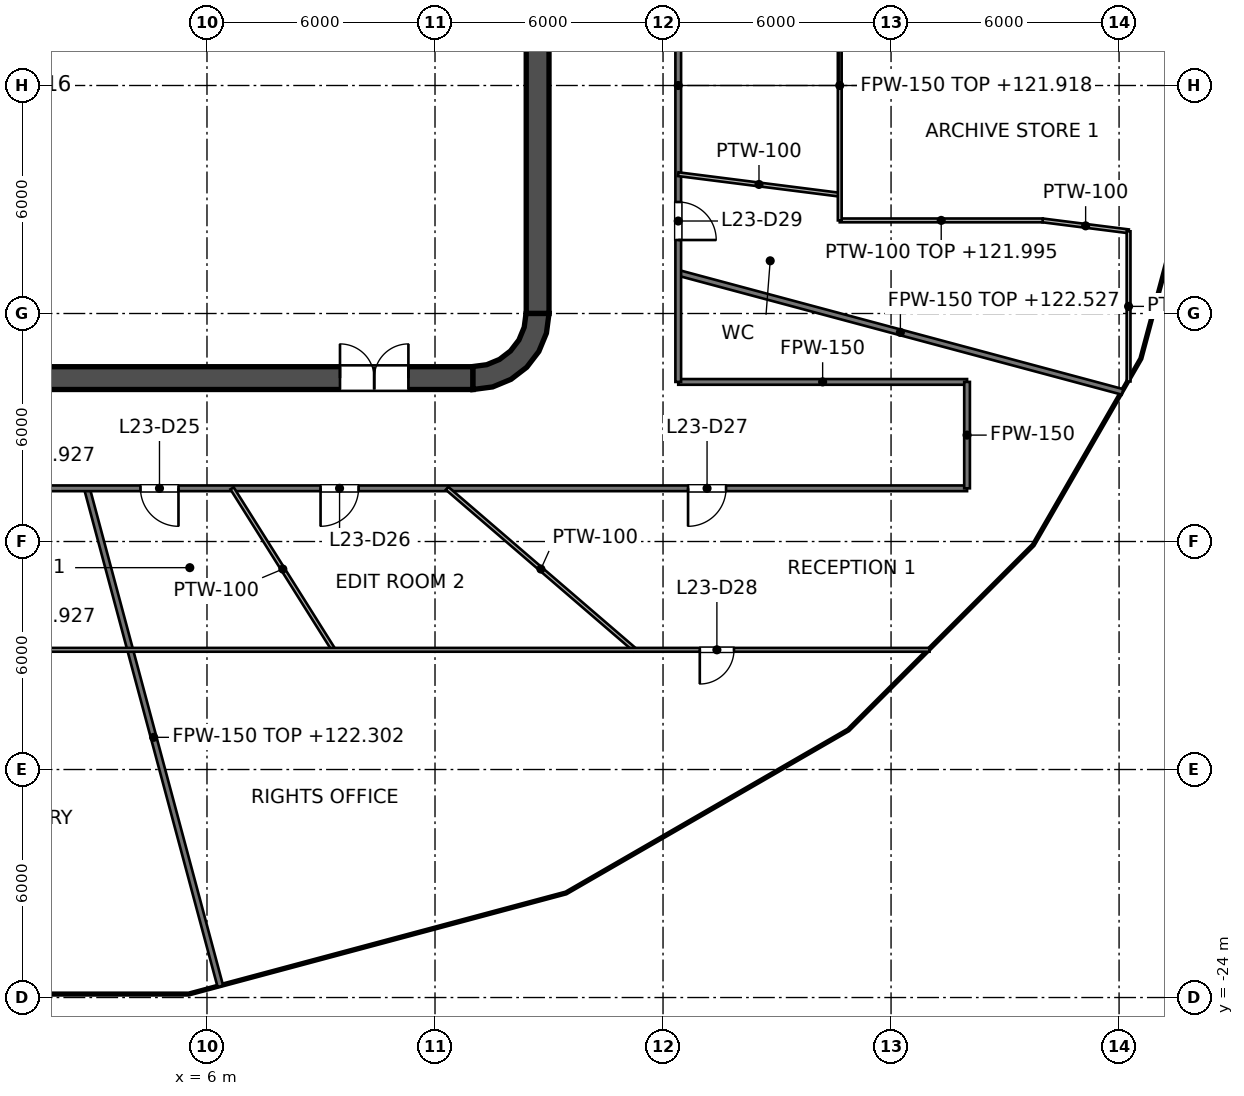
"""IFC4 building model, lengths in metres.
Left out: names, types, materials, properties, quantities, classifications, styles, units other than length and angle.
Written with IfcOpenShell. Run it as: python <this file> out.ifc"""

import sys

from ifc_helpers import new_model, si_unit, direction, frame, frame_2d, origin, place, context, subcontext, project, spatial, polyline, rectangle, outline, extrude, element, fill, save


model = new_model("IFC4")
c1 = context("Model", 3, precision=1e-05, world=origin(), true_north=direction((0.0, 1.0)))
c2 = subcontext(c1, "Body", "Model", "MODEL_VIEW")
j1 = project(units=[si_unit("LENGTHUNIT", "METRE"), si_unit("PLANEANGLEUNIT", "RADIAN")], contexts=[c1])
p1 = place(None, origin())
s1 = spatial("IfcSite", under=j1, at=p1, CompositionType="ELEMENT")
p2 = place(p1, origin())
s2 = spatial("IfcBuilding", under=s1, at=p2, CompositionType="ELEMENT")
p3 = place(p2, frame((0.0, 0.0, 118.8)))
s3 = spatial("IfcBuildingStorey", under=s2, at=p3, CompositionType="ELEMENT", Elevation=118.8)
p4 = place(p3, frame((-13.0, -7.7, 0.0), z_axis=(0.0, 0.0, 1.0), x_axis=(1.0, 0.0, 0.0)))
e1 = element("IfcWall", 1, at=p4, inside=s3, PredefinedType="SHEAR", context=c2, shape_type="SweptSolid", body=[
    extrude(rectangle(XDim=26.0, YDim=0.6, at=frame_2d((13.0, 0.0))), origin(), (0.0, 0.0, 1.0), 4.2),
])
p5 = place(p4, frame((1.7, 0.0, 0.0)))
e2 = element("IfcOpeningElement", 2, at=p5, cuts=e1, PredefinedType="OPENING", context=c2, shape_type="SweptSolid", body=[
    extrude(rectangle(XDim=1.8, YDim=2.1, at=frame_2d((0.9, 1.05))), frame((0.0, 0.3, 0.0), z_axis=(0.0, -1.0, 0.0), x_axis=(1.0, 0.0, 0.0)), (0.0, 0.0, 1.0), 0.6),
])
p6 = place(p4, frame((22.5, 0.0, 0.0)))
e3 = element("IfcOpeningElement", 3, at=p6, cuts=e1, PredefinedType="OPENING", context=c2, shape_type="SweptSolid", body=[
    extrude(rectangle(XDim=1.8, YDim=2.1, at=frame_2d((0.9, 1.05))), frame((0.0, 0.3, 0.0), z_axis=(0.0, -1.0, 0.0), x_axis=(1.0, 0.0, 0.0)), (0.0, 0.0, 1.0), 0.6),
])
p7 = place(p3, frame((14.7, -6.0, 0.0), z_axis=(0.0, 0.0, 1.0), x_axis=(0.0, 1.0, 0.0)))
e4 = element("IfcWall", 4, at=p7, inside=s3, PredefinedType="SHEAR", context=c2, shape_type="SweptSolid", body=[
    extrude(rectangle(XDim=12.0, YDim=0.6, at=frame_2d((6.0, 0.0))), origin(), (0.0, 0.0, 1.0), 4.2),
])
p8 = place(p3, origin())
e5 = element("IfcWall", 5, at=p8, inside=s3, PredefinedType="SHEAR", context=c2, shape_type="SweptSolid", body=[
    extrude(outline(polyline([(15.0, -6.0), (14.395, -6.0), (14.347, -6.361), (14.208, -6.698), (13.986, -6.986), (13.698, -7.208), (13.361, -7.347), (13.0, -7.395), (13.0, -8.0), (13.518, -7.932), (14.0, -7.732), (14.414, -7.414), (14.732, -7.0), (14.932, -6.518), (15.0, -6.0)])), origin(), (0.0, 0.0, 1.0), 4.2),
])
p9 = place(p3, frame((9.0, -6.6, 0.0), z_axis=(0.0, 0.0, 1.0), x_axis=(0.0, 1.0, 0.0)))
e6 = element("IfcWall", 6, at=p9, inside=s3, PredefinedType="SOLIDWALL", context=c2, shape_type="SweptSolid", body=[
    extrude(rectangle(XDim=2.5, YDim=0.25, at=frame_2d((1.25, 0.0))), origin(), (0.0, 0.0, 1.0), 4.05),
])
p10 = place(p9, frame((0.65, 0.0, 0.0)))
e7 = element("IfcOpeningElement", 7, at=p10, cuts=e6, PredefinedType="OPENING", context=c2, shape_type="SweptSolid", body=[
    extrude(rectangle(XDim=1.2, YDim=2.1, at=frame_2d((0.6, 1.05))), frame((0.0, 0.125, 0.0), z_axis=(0.0, -1.0, 0.0), x_axis=(1.0, 0.0, 0.0)), (0.0, 0.0, 1.0), 0.25),
])
p11 = place(p3, frame((3.15, -6.6, 0.0), z_axis=(0.0, 0.0, 1.0), x_axis=(0.0, 1.0, 0.0)))
e8 = element("IfcWall", 8, at=p11, inside=s3, PredefinedType="SOLIDWALL", context=c2, shape_type="SweptSolid", body=[
    extrude(rectangle(XDim=2.5, YDim=0.25, at=frame_2d((1.25, 0.0))), origin(), (0.0, 0.0, 1.0), 4.05),
])
p12 = place(p3, frame((-9.125, -7.0, 0.0), z_axis=(0.0, 0.0, 1.0), x_axis=(1.0, 0.0, 0.0)))
e9 = element("IfcWall", 9, at=p12, inside=s3, PredefinedType="SOLIDWALL", context=c2, shape_type="SweptSolid", body=[
    extrude(rectangle(XDim=18.25, YDim=0.8, at=frame_2d((9.125, 0.0))), origin(), (0.0, 0.0, 1.0), 4.05),
])
p13 = place(p3, frame((-9.125, -1.525, 0.0), z_axis=(0.0, 0.0, 1.0), x_axis=(1.0, 0.0, 0.0)))
e10 = element("IfcWall", 10, at=p13, inside=s3, PredefinedType="SOLIDWALL", context=c2, shape_type="SweptSolid", body=[
    extrude(rectangle(XDim=18.25, YDim=0.25, at=frame_2d((9.125, 0.0))), origin(), (0.0, 0.0, 1.0), 4.05),
])
p14 = place(p13, frame((7.15, 0.0, 0.0)))
e11 = element("IfcOpeningElement", 11, at=p14, cuts=e10, PredefinedType="OPENING", context=c2, shape_type="SweptSolid", body=[
    extrude(rectangle(XDim=1.2, YDim=2.1, at=frame_2d((0.6, 1.05))), frame((0.0, 0.125, 0.0), z_axis=(0.0, -1.0, 0.0), x_axis=(1.0, 0.0, 0.0)), (0.0, 0.0, 1.0), 0.25),
])
p15 = place(p13, frame((10.2, 0.0, 0.0)))
e12 = element("IfcOpeningElement", 12, at=p15, cuts=e10, PredefinedType="OPENING", context=c2, shape_type="SweptSolid", body=[
    extrude(rectangle(XDim=1.2, YDim=2.1, at=frame_2d((0.6, 1.05))), frame((0.0, 0.125, 0.0), z_axis=(0.0, -1.0, 0.0), x_axis=(1.0, 0.0, 0.0)), (0.0, 0.0, 1.0), 0.25),
])
p16 = place(p13, frame((16.075, 0.0, 0.0)))
e13 = element("IfcOpeningElement", 13, at=p16, cuts=e10, PredefinedType="OPENING", context=c2, shape_type="SweptSolid", body=[
    extrude(rectangle(XDim=1.0, YDim=2.1, at=frame_2d((0.5, 1.05))), frame((0.0, 0.125, 0.0), z_axis=(0.0, -1.0, 0.0), x_axis=(1.0, 0.0, 0.0)), (0.0, 0.0, 1.0), 0.25),
])
p17 = place(p3, frame((-9.125, -3.975, 0.0), z_axis=(0.0, 0.0, 1.0), x_axis=(1.0, 0.0, 0.0)))
e14 = element("IfcWall", 14, at=p17, inside=s3, PredefinedType="SOLIDWALL", context=c2, shape_type="SweptSolid", body=[
    extrude(rectangle(XDim=12.4, YDim=0.25, at=frame_2d((6.2, 0.0))), origin(), (0.0, 0.0, 1.0), 4.05),
])
p18 = place(p17, frame((1.05, 0.0, 0.0)))
e15 = element("IfcOpeningElement", 15, at=p18, cuts=e14, PredefinedType="OPENING", context=c2, shape_type="SweptSolid", body=[
    extrude(rectangle(XDim=1.2, YDim=2.1, at=frame_2d((0.6, 1.05))), frame((0.0, 0.125, 0.0), z_axis=(0.0, -1.0, 0.0), x_axis=(1.0, 0.0, 0.0)), (0.0, 0.0, 1.0), 0.25),
])
p19 = place(p17, frame((4.1, 0.0, 0.0)))
e16 = element("IfcOpeningElement", 16, at=p19, cuts=e14, PredefinedType="OPENING", context=c2, shape_type="SweptSolid", body=[
    extrude(rectangle(XDim=1.2, YDim=2.1, at=frame_2d((0.6, 1.05))), frame((0.0, 0.125, 0.0), z_axis=(0.0, -1.0, 0.0), x_axis=(1.0, 0.0, 0.0)), (0.0, 0.0, 1.0), 0.25),
])
p20 = place(p3, frame((3.275, -3.975, 0.0), z_axis=(0.0, 0.0, 1.0), x_axis=(1.0, 0.0, 0.0)))
e17 = element("IfcWall", 17, at=p20, inside=s3, PredefinedType="SOLIDWALL", context=c2, shape_type="SweptSolid", body=[
    extrude(rectangle(XDim=5.85, YDim=0.25, at=frame_2d((2.925, 0.0))), origin(), (0.0, 0.0, 1.0), 4.05),
])
for number, where, z_axis, x_axis in (
    (18, (3.2, -3.85, 0.0), (0.0, 0.0, 1.0), (0.0, 1.0, 0.0)),
    (19, (5.9, -3.85, 0.0), (0.0, 0.0, 1.0), (0.0, 1.0, 0.0)),
    (20, (9.0, -3.85, 0.0), (0.0, 0.0, 1.0), (0.0, 1.0, 0.0)),
):
    element("IfcWall", number, at=place(p3, frame(where, z_axis=z_axis, x_axis=x_axis)), inside=s3, PredefinedType="SOLIDWALL", context=c2, shape_type="SweptSolid", body=[
        extrude(rectangle(XDim=2.2, YDim=0.25, at=frame_2d((1.1, 0.0))), origin(), (0.0, 0.0, 1.0), 4.05),
    ])
p21 = place(p3, frame((11.8, -7.4, 0.0), z_axis=(0.0, 0.0, 1.0), x_axis=(0.0, 1.0, 0.0)))
e21 = element("IfcWall", 21, at=p21, inside=s3, PredefinedType="SOLIDWALL", context=c2, shape_type="SweptSolid", body=[
    extrude(rectangle(XDim=14.8, YDim=0.4, at=frame_2d((7.4, 0.0))), origin(), (0.0, 0.0, 1.0), 4.05),
])
p22 = place(p21, frame((11.2, 0.0, 0.0)))
e22 = element("IfcOpeningElement", 22, at=p22, cuts=e21, PredefinedType="OPENING", context=c2, shape_type="SweptSolid", body=[
    extrude(rectangle(XDim=1.1, YDim=2.1, at=frame_2d((0.55, 1.05))), frame((0.0, 0.2, 0.0), z_axis=(0.0, -1.0, 0.0), x_axis=(1.0, 0.0, 0.0)), (0.0, 0.0, 1.0), 0.4),
])
p23 = place(p21, frame((8.3, 0.0, 0.0)))
e23 = element("IfcOpeningElement", 23, at=p23, cuts=e21, PredefinedType="OPENING", context=c2, shape_type="SweptSolid", body=[
    extrude(rectangle(XDim=1.1, YDim=2.1, at=frame_2d((0.55, 1.05))), frame((0.0, 0.2, 0.0), z_axis=(0.0, -1.0, 0.0), x_axis=(1.0, 0.0, 0.0)), (0.0, 0.0, 1.0), 0.4),
])
p24 = place(p21, frame((5.4, 0.0, 0.0)))
e24 = element("IfcOpeningElement", 24, at=p24, cuts=e21, PredefinedType="OPENING", context=c2, shape_type="SweptSolid", body=[
    extrude(rectangle(XDim=1.1, YDim=2.1, at=frame_2d((0.55, 1.05))), frame((0.0, 0.2, 0.0), z_axis=(0.0, -1.0, 0.0), x_axis=(1.0, 0.0, 0.0)), (0.0, 0.0, 1.0), 0.4),
])
p25 = place(p21, frame((13.552, 0.0, 0.0)))
e25 = element("IfcOpeningElement", 25, at=p25, cuts=e21, PredefinedType="OPENING", context=c2, shape_type="SweptSolid", body=[
    extrude(rectangle(XDim=0.9, YDim=2.1, at=frame_2d((0.45, 1.05))), frame((0.0, 0.2, 0.0), z_axis=(0.0, -1.0, 0.0), x_axis=(1.0, 0.0, 0.0)), (0.0, 0.0, 1.0), 0.4),
])
p26 = place(p21, frame((0.347, 0.0, 0.0)))
e26 = element("IfcOpeningElement", 26, at=p26, cuts=e21, PredefinedType="OPENING", context=c2, shape_type="SweptSolid", body=[
    extrude(rectangle(XDim=0.9, YDim=2.1, at=frame_2d((0.45, 1.05))), frame((0.0, 0.2, 0.0), z_axis=(0.0, -1.0, 0.0), x_axis=(1.0, 0.0, 0.0)), (0.0, 0.0, 1.0), 0.4),
])
e27 = element("IfcWall", 27, at=p8, inside=s3, PredefinedType="SOLIDWALL", context=c2, shape_type="SweptSolid", body=[
    extrude(outline(polyline([(12.0, -5.675), (12.0, -5.925), (14.15, -5.925), (14.4, -5.925), (14.4, -5.675), (14.4, -3.025), (14.4, -2.775), (14.4, -0.125), (14.4, 0.125), (14.4, 2.775), (14.4, 3.025), (14.4, 5.675), (14.4, 5.925), (14.15, 5.925), (12.0, 5.925), (12.0, 5.675), (14.15, 5.675), (14.15, 3.025), (12.0, 3.025), (12.0, 2.775), (14.15, 2.775), (14.15, 0.125), (12.0, 0.125), (12.0, -0.125), (14.15, -0.125), (14.15, -2.775), (12.0, -2.775), (12.0, -3.025), (14.15, -3.025), (14.15, -5.675), (12.0, -5.675)])), origin(), (0.0, 0.0, 1.0), 4.05),
])
p27 = place(p3, frame((2.84, -10.6, 0.0), z_axis=(0.0, 0.0, 1.0), x_axis=(0.258835018107, -0.965921546194, 0.0)))
e28 = element("IfcWall", 28, at=p27, inside=s3, PredefinedType="PARTITIONING", context=c2, shape_type="SweptSolid", body=[
    extrude(rectangle(XDim=13.568, YDim=0.15, at=frame_2d((6.784, 0.0))), origin(), (0.0, 0.0, 1.0), 3.502),
])
p28 = place(p3, frame((18.4, -4.93, 0.0), z_axis=(0.0, 0.0, 1.0), x_axis=(0.965917167339, -0.258851358583, 0.0)))
e29 = element("IfcWall", 29, at=p28, inside=s3, PredefinedType="PARTITIONING", context=c2, shape_type="SweptSolid", body=[
    extrude(rectangle(XDim=12.104, YDim=0.15, at=frame_2d((6.052, 0.0))), origin(), (0.0, 0.0, 1.0), 3.727),
])
p29 = place(p3, frame((-26.0, -10.6, 0.0), z_axis=(0.0, 0.0, 1.0), x_axis=(1.0, 0.0, 0.0)))
e30 = element("IfcWall", 30, at=p29, inside=s3, PredefinedType="PARTITIONING", context=c2, shape_type="SweptSolid", body=[
    extrude(rectangle(XDim=52.0, YDim=0.15, at=frame_2d((26.0, 0.0))), origin(), (0.0, 0.0, 1.0), 3.127),
])
p30 = place(p29, frame((17.62, 0.0, 0.0)))
e31 = element("IfcOpeningElement", 31, at=p30, cuts=e30, PredefinedType="OPENING", context=c2, shape_type="SweptSolid", body=[
    extrude(rectangle(XDim=1.2, YDim=2.1, at=frame_2d((0.6, 1.05))), frame((0.0, 0.075, 0.0), z_axis=(0.0, -1.0, 0.0), x_axis=(1.0, 0.0, 0.0)), (0.0, 0.0, 1.0), 0.15),
])
p31 = place(p29, frame((30.25, 0.0, 0.0)))
e32 = element("IfcOpeningElement", 32, at=p31, cuts=e30, PredefinedType="OPENING", context=c2, shape_type="SweptSolid", body=[
    extrude(rectangle(XDim=1.0, YDim=2.1, at=frame_2d((0.5, 1.05))), frame((0.0, 0.075, 0.0), z_axis=(0.0, -1.0, 0.0), x_axis=(1.0, 0.0, 0.0)), (0.0, 0.0, 1.0), 0.15),
])
p32 = place(p29, frame((34.989, 0.0, 0.0)))
e33 = element("IfcOpeningElement", 33, at=p32, cuts=e30, PredefinedType="OPENING", context=c2, shape_type="SweptSolid", body=[
    extrude(rectangle(XDim=1.0, YDim=2.1, at=frame_2d((0.5, 1.05))), frame((0.0, 0.075, 0.0), z_axis=(0.0, -1.0, 0.0), x_axis=(1.0, 0.0, 0.0)), (0.0, 0.0, 1.0), 0.15),
])
p33 = place(p29, frame((44.658, 0.0, 0.0)))
e34 = element("IfcOpeningElement", 34, at=p33, cuts=e30, PredefinedType="OPENING", context=c2, shape_type="SweptSolid", body=[
    extrude(rectangle(XDim=1.0, YDim=2.1, at=frame_2d((0.5, 1.05))), frame((0.0, 0.075, 0.0), z_axis=(0.0, -1.0, 0.0), x_axis=(1.0, 0.0, 0.0)), (0.0, 0.0, 1.0), 0.15),
])
p34 = place(p3, frame((18.4, -7.8, 0.0), z_axis=(0.0, 0.0, 1.0), x_axis=(1.0, 0.0, 0.0)))
e35 = element("IfcWall", 35, at=p34, inside=s3, PredefinedType="PARTITIONING", context=c2, shape_type="SweptSolid", body=[
    extrude(rectangle(XDim=7.6, YDim=0.15, at=frame_2d((3.8, 0.0))), origin(), (0.0, 0.0, 1.0), 3.276),
])
p35 = place(p3, frame((26.0, -10.6, 0.0), z_axis=(0.0, 0.0, 1.0), x_axis=(0.0, 1.0, 0.0)))
e36 = element("IfcWall", 36, at=p35, inside=s3, PredefinedType="PARTITIONING", context=c2, shape_type="SweptSolid", body=[
    extrude(rectangle(XDim=2.8, YDim=0.15, at=frame_2d((1.4, 0.0))), origin(), (0.0, 0.0, 1.0), 3.276),
])
p36 = place(p3, frame((18.4, -7.8, 0.0), z_axis=(0.0, 0.0, 1.0), x_axis=(0.0, 1.0, 0.0)))
e37 = element("IfcWall", 37, at=p36, inside=s3, PredefinedType="PARTITIONING", context=c2, shape_type="SweptSolid", body=[
    extrude(rectangle(XDim=15.6, YDim=0.15, at=frame_2d((7.8, 0.0))), origin(), (0.0, 0.0, 1.0), 3.118),
])
p37 = place(p36, frame((3.734, 0.0, 0.0)))
e38 = element("IfcOpeningElement", 38, at=p37, cuts=e37, PredefinedType="OPENING", context=c2, shape_type="SweptSolid", body=[
    extrude(rectangle(XDim=1.0, YDim=2.1, at=frame_2d((0.5, 1.05))), frame((0.0, 0.075, 0.0), z_axis=(0.0, -1.0, 0.0), x_axis=(1.0, 0.0, 0.0)), (0.0, 0.0, 1.0), 0.15),
])
p38 = place(p3, frame((6.66, -10.6, 0.0), z_axis=(0.0, 0.0, 1.0), x_axis=(0.532130705972, -0.846662218221, 0.0)))
e39 = element("IfcWall", 39, at=p38, inside=s3, PredefinedType="PARTITIONING", context=c2, shape_type="SweptSolid", body=[
    extrude(rectangle(XDim=5.02, YDim=0.1, at=frame_2d((2.51, 0.0))), origin(), (0.0, 0.0, 1.0), 4.05),
])
p39 = place(p3, frame((12.317, -10.6, 0.0), z_axis=(0.0, 0.0, 1.0), x_axis=(0.758012166178, -0.652240412675, 0.0)))
e40 = element("IfcWall", 40, at=p39, inside=s3, PredefinedType="PARTITIONING", context=c2, shape_type="SweptSolid", body=[
    extrude(rectangle(XDim=6.516, YDim=0.1, at=frame_2d((3.258, 0.0))), origin(), (0.0, 0.0, 1.0), 4.05),
])
p40 = place(p3, frame((18.4, -2.334, 0.0), z_axis=(0.0, 0.0, 1.0), x_axis=(0.992044690644, -0.125886185756, 0.0)))
e41 = element("IfcWall", 41, at=p40, inside=s3, PredefinedType="PARTITIONING", context=c2, shape_type="SweptSolid", body=[
    extrude(rectangle(XDim=4.284, YDim=0.1, at=frame_2d((2.142, 0.0))), origin(), (0.0, 0.0, 1.0), 4.05),
])
p41 = place(p3, frame((27.99, -3.55, 0.0), z_axis=(0.0, 0.0, 1.0), x_axis=(0.992040317819, -0.125920640968, 0.0)))
e42 = element("IfcWall", 42, at=p41, inside=s3, PredefinedType="PARTITIONING", context=c2, shape_type="SweptSolid", body=[
    extrude(rectangle(XDim=2.278, YDim=0.1, at=frame_2d((1.139, 0.0))), origin(), (0.0, 0.0, 1.0), 4.05),
])
p42 = place(p3, frame((-25.013, -14.85, 0.0), z_axis=(0.0, 0.0, 1.0), x_axis=(1.0, 0.0, 0.0)))
e43 = element("IfcWall", 43, at=p42, inside=s3, PredefinedType="PARTITIONING", context=c2, shape_type="SweptSolid", body=[
    extrude(rectangle(XDim=50.026, YDim=0.1, at=frame_2d((25.013, 0.0))), origin(), (0.0, 0.0, 1.0), 3.127),
])
p43 = place(p42, frame((13.546, 0.0, 0.0)))
e44 = element("IfcOpeningElement", 44, at=p43, cuts=e43, PredefinedType="OPENING", context=c2, shape_type="SweptSolid", body=[
    extrude(rectangle(XDim=1.8, YDim=2.1, at=frame_2d((0.9, 1.05))), frame((0.0, 0.05, 0.0), z_axis=(0.0, -1.0, 0.0), x_axis=(1.0, 0.0, 0.0)), (0.0, 0.0, 1.0), 0.1),
])
p44 = place(p42, frame((43.98, 0.0, 0.0)))
e45 = element("IfcOpeningElement", 45, at=p44, cuts=e43, PredefinedType="OPENING", context=c2, shape_type="SweptSolid", body=[
    extrude(rectangle(XDim=0.9, YDim=2.1, at=frame_2d((0.45, 1.05))), frame((0.0, 0.05, 0.0), z_axis=(0.0, -1.0, 0.0), x_axis=(1.0, 0.0, 0.0)), (0.0, 0.0, 1.0), 0.1),
])
p45 = place(p3, frame((22.65, -3.55, 0.0), z_axis=(0.0, 0.0, 1.0), x_axis=(1.0, 0.0, 0.0)))
e46 = element("IfcWall", 46, at=p45, inside=s3, PredefinedType="PARTITIONING", context=c2, shape_type="SweptSolid", body=[
    extrude(rectangle(XDim=5.34, YDim=0.1, at=frame_2d((2.67, 0.0))), origin(), (0.0, 0.0, 1.0), 3.195),
])
p46 = place(p3, frame((30.25, -7.788, 0.0), z_axis=(0.0, 0.0, 1.0), x_axis=(0.0, 1.0, 0.0)))
e47 = element("IfcWall", 47, at=p46, inside=s3, PredefinedType="PARTITIONING", context=c2, shape_type="SweptSolid", body=[
    extrude(rectangle(XDim=3.951, YDim=0.1, at=frame_2d((1.976, 0.0))), origin(), (0.0, 0.0, 1.0), 3.127),
])
p47 = place(p3, frame((22.65, -3.55, 0.0), z_axis=(0.0, 0.0, 1.0), x_axis=(0.0, 1.0, 0.0)))
e48 = element("IfcWall", 48, at=p47, inside=s3, PredefinedType="PARTITIONING", context=c2, shape_type="SweptSolid", body=[
    extrude(rectangle(XDim=7.1, YDim=0.1, at=frame_2d((3.55, 0.0))), origin(), (0.0, 0.0, 1.0), 3.118),
])
p48 = place(p24, origin())
e49 = element("IfcDoor", 49, at=p48, inside=s3, OperationType="DOUBLE_DOOR_SLIDING", PredefinedType="DOOR", context=c2, shape_type="SweptSolid", body=[
    extrude(rectangle(XDim=1.1, YDim=2.1, at=frame_2d((0.55, 1.05))), frame((0.0, 0.025, 0.0), z_axis=(0.0, -1.0, 0.0), x_axis=(1.0, 0.0, 0.0)), (0.0, 0.0, 1.0), 0.05),
])
fill(e24, e49)
p49 = place(p15, origin())
e50 = element("IfcDoor", 50, at=p49, inside=s3, OperationType="DOUBLE_DOOR_SLIDING", PredefinedType="DOOR", context=c2, shape_type="SweptSolid", body=[
    extrude(rectangle(XDim=1.2, YDim=2.1, at=frame_2d((0.6, 1.05))), frame((0.0, 0.025, 0.0), z_axis=(0.0, -1.0, 0.0), x_axis=(1.0, 0.0, 0.0)), (0.0, 0.0, 1.0), 0.05),
])
fill(e12, e50)
p50 = place(p10, origin())
e51 = element("IfcDoor", 51, at=p50, inside=s3, OperationType="SINGLE_SWING_LEFT", PredefinedType="DOOR", context=c2, shape_type="SweptSolid", body=[
    extrude(rectangle(XDim=1.2, YDim=2.1, at=frame_2d((0.6, 1.05))), frame((0.0, 0.025, 0.0), z_axis=(0.0, -1.0, 0.0), x_axis=(1.0, 0.0, 0.0)), (0.0, 0.0, 1.0), 0.05),
])
fill(e7, e51)
p51 = place(p16, origin())
e52 = element("IfcDoor", 52, at=p51, inside=s3, OperationType="SINGLE_SWING_RIGHT", PredefinedType="DOOR", context=c2, shape_type="SweptSolid", body=[
    extrude(rectangle(XDim=1.0, YDim=2.1, at=frame_2d((0.5, 1.05))), frame((0.0, 0.025, 0.0), z_axis=(0.0, -1.0, 0.0), x_axis=(1.0, 0.0, 0.0)), (0.0, 0.0, 1.0), 0.05),
])
fill(e13, e52)
p52 = place(p26, origin())
e53 = element("IfcDoor", 53, at=p52, inside=s3, OperationType="SINGLE_SWING_RIGHT", PredefinedType="DOOR", context=c2, shape_type="SweptSolid", body=[
    extrude(rectangle(XDim=0.9, YDim=2.1, at=frame_2d((0.45, 1.05))), frame((0.0, 0.025, 0.0), z_axis=(0.0, -1.0, 0.0), x_axis=(1.0, 0.0, 0.0)), (0.0, 0.0, 1.0), 0.05),
])
fill(e26, e53)
p53 = place(p6, origin())
e54 = element("IfcDoor", 54, at=p53, inside=s3, OperationType="DOUBLE_DOOR_SINGLE_SWING", PredefinedType="DOOR", context=c2, shape_type="SweptSolid", body=[
    extrude(rectangle(XDim=1.8, YDim=2.1, at=frame_2d((0.9, 1.05))), frame((0.0, 0.025, 0.0), z_axis=(0.0, -1.0, 0.0), x_axis=(1.0, 0.0, 0.0)), (0.0, 0.0, 1.0), 0.05),
])
fill(e3, e54)
p54 = place(p31, origin())
e55 = element("IfcDoor", 55, at=p54, inside=s3, OperationType="SINGLE_SWING_RIGHT", PredefinedType="DOOR", context=c2, shape_type="SweptSolid", body=[
    extrude(rectangle(XDim=1.0, YDim=2.1, at=frame_2d((0.5, 1.05))), frame((0.0, 0.025, 0.0), z_axis=(0.0, -1.0, 0.0), x_axis=(1.0, 0.0, 0.0)), (0.0, 0.0, 1.0), 0.05),
])
fill(e32, e55)
p55 = place(p32, origin())
e56 = element("IfcDoor", 56, at=p55, inside=s3, OperationType="SINGLE_SWING_LEFT", PredefinedType="DOOR", context=c2, shape_type="SweptSolid", body=[
    extrude(rectangle(XDim=1.0, YDim=2.1, at=frame_2d((0.5, 1.05))), frame((0.0, 0.025, 0.0), z_axis=(0.0, -1.0, 0.0), x_axis=(1.0, 0.0, 0.0)), (0.0, 0.0, 1.0), 0.05),
])
fill(e33, e56)
p56 = place(p33, origin())
e57 = element("IfcDoor", 57, at=p56, inside=s3, OperationType="SINGLE_SWING_LEFT", PredefinedType="DOOR", context=c2, shape_type="SweptSolid", body=[
    extrude(rectangle(XDim=1.0, YDim=2.1, at=frame_2d((0.5, 1.05))), frame((0.0, 0.025, 0.0), z_axis=(0.0, -1.0, 0.0), x_axis=(1.0, 0.0, 0.0)), (0.0, 0.0, 1.0), 0.05),
])
fill(e34, e57)
p57 = place(p44, origin())
e58 = element("IfcDoor", 58, at=p57, inside=s3, OperationType="SINGLE_SWING_LEFT", PredefinedType="DOOR", context=c2, shape_type="SweptSolid", body=[
    extrude(rectangle(XDim=0.9, YDim=2.1, at=frame_2d((0.45, 1.05))), frame((0.0, 0.025, 0.0), z_axis=(0.0, -1.0, 0.0), x_axis=(1.0, 0.0, 0.0)), (0.0, 0.0, 1.0), 0.05),
])
fill(e45, e58)
p58 = place(p37, origin())
e59 = element("IfcDoor", 59, at=p58, inside=s3, OperationType="SINGLE_SWING_LEFT", PredefinedType="DOOR", context=c2, shape_type="SweptSolid", body=[
    extrude(rectangle(XDim=1.0, YDim=2.1, at=frame_2d((0.5, 1.05))), frame((0.0, 0.025, 0.0), z_axis=(0.0, -1.0, 0.0), x_axis=(1.0, 0.0, 0.0)), (0.0, 0.0, 1.0), 0.05),
])
fill(e38, e59)
save(model, sys.argv[1])
